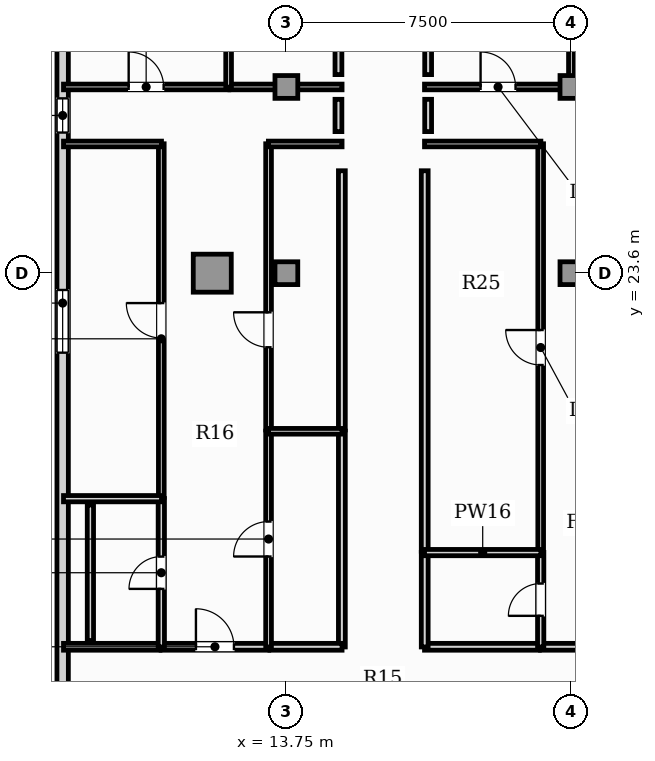
"""IFC4 building model, lengths in metres.
Left out: names, types, materials, properties, quantities, classifications, styles, units other than length and angle.
Written with IfcOpenShell. Run it as: python <this file> out.ifc"""

import sys

from ifc_helpers import new_model, si_unit, direction, frame, frame_2d, origin, origin_2d, place, context, subcontext, project, spatial, rectangle, hollow_rectangle, extrude, element, fill, save


model = new_model("IFC4")
c1 = context("Model", 3, precision=1e-05, world=origin(), true_north=direction((0.0, 1.0)))
c2 = subcontext(c1, "Body", "Model", "MODEL_VIEW")
j1 = project(units=[si_unit("LENGTHUNIT", "METRE"), si_unit("PLANEANGLEUNIT", "RADIAN")], contexts=[c1])
p1 = place(None, origin())
s1 = spatial("IfcSite", under=j1, at=p1, CompositionType="ELEMENT")
p2 = place(p1, origin())
s2 = spatial("IfcBuilding", under=s1, at=p2, CompositionType="ELEMENT")
p3 = place(p2, frame((0.0, 0.0, 242.65)))
s3 = spatial("IfcBuildingStorey", under=s2, at=p3, CompositionType="ELEMENT", Elevation=242.65)
p4 = place(p3, frame((11.8, 23.6, 0.0), z_axis=(0.0, 0.0, 1.0), x_axis=(1.0, 0.0, 0.0)))
e1 = element("IfcColumn", 1, at=p4, inside=s3, PredefinedType="USERDEFINED", context=c2, shape_type="SweptSolid", body=[
    extrude(hollow_rectangle(XDim=1.0, YDim=1.0, WallThickness=0.06, at=origin_2d()), origin(), (0.0, 0.0, 1.0), 3.85),
])
for number, where, z_axis, x_axis in (
    (2, (13.75, 23.6, 0.0), (0.0, 0.0, 1.0), (1.0, 0.0, 0.0)),
    (3, (21.25, 23.6, 0.0), (0.0, 0.0, 1.0), (1.0, 0.0, 0.0)),
    (4, (13.75, 28.5, 0.0), (0.0, 0.0, 1.0), (1.0, 0.0, 0.0)),
    (5, (21.25, 28.5, 0.0), (0.0, 0.0, 1.0), (1.0, 0.0, 0.0)),
):
    element("IfcColumn", number, at=place(p3, frame(where, z_axis=z_axis, x_axis=x_axis)), inside=s3, PredefinedType="COLUMN", context=c2, shape_type="SweptSolid", body=[
        extrude(rectangle(XDim=0.6, YDim=0.6, at=origin_2d()), origin(), (0.0, 0.0, 1.0), 3.85),
    ])
p5 = place(p3, frame((7.863, 33.343, 0.0), z_axis=(0.0, 0.0, 1.0), x_axis=(0.0, -1.0, 0.0)))
e6 = element("IfcWall", 6, at=p5, inside=s3, PredefinedType="SOLIDWALL", context=c2, shape_type="SweptSolid", body=[
    extrude(rectangle(XDim=30.103, YDim=0.3, at=frame_2d((15.052, 0.0))), origin(), (0.0, 0.0, 1.0), 3.5),
])
p6 = place(p5, frame((24.044, 0.0, 0.85)))
e7 = element("IfcOpeningElement", 7, at=p6, cuts=e6, PredefinedType="OPENING", context=c2, shape_type="SweptSolid", body=[
    extrude(rectangle(XDim=2.4, YDim=2.0, at=frame_2d((1.2, 1.0))), frame((0.0, 0.16, 0.0), z_axis=(0.0, -1.0, 0.0), x_axis=(1.0, 0.0, 0.0)), (0.0, 0.0, 1.0), 0.32),
])
p7 = place(p5, frame((5.143, 0.0, 0.95)))
e8 = element("IfcOpeningElement", 8, at=p7, cuts=e6, PredefinedType="OPENING", context=c2, shape_type="SweptSolid", body=[
    extrude(rectangle(XDim=0.9, YDim=1.5, at=frame_2d((0.45, 0.75))), frame((0.0, 0.16, 0.0), z_axis=(0.0, -1.0, 0.0), x_axis=(1.0, 0.0, 0.0)), (0.0, 0.0, 1.0), 0.32),
])
p8 = place(p5, frame((10.185, 0.0, 0.88)))
e9 = element("IfcOpeningElement", 9, at=p8, cuts=e6, PredefinedType="OPENING", context=c2, shape_type="SweptSolid", body=[
    extrude(rectangle(XDim=1.65, YDim=2.0, at=frame_2d((0.825, 1.0))), frame((0.0, 0.16, 0.0), z_axis=(0.0, -1.0, 0.0), x_axis=(1.0, 0.0, 0.0)), (0.0, 0.0, 1.0), 0.32),
])
p9 = place(p3, frame((10.454, 13.77, 0.0), z_axis=(0.0, 0.0, 1.0), x_axis=(1.0, 0.0, 0.0)))
e10 = element("IfcWall", 10, at=p9, inside=s3, PredefinedType="PARTITIONING", context=c2, shape_type="SweptSolid", body=[
    extrude(rectangle(XDim=2.832, YDim=0.18, at=frame_2d((1.416, 0.0))), origin(), (0.0, 0.0, 1.0), 3.5),
])
p10 = place(p9, frame((0.916, 0.0, 0.0)))
e11 = element("IfcOpeningElement", 11, at=p10, cuts=e10, PredefinedType="OPENING", context=c2, shape_type="SweptSolid", body=[
    extrude(rectangle(XDim=1.0, YDim=2.15, at=frame_2d((0.5, 1.075))), frame((0.0, 0.1, 0.0), z_axis=(0.0, -1.0, 0.0), x_axis=(1.0, 0.0, 0.0)), (0.0, 0.0, 1.0), 0.2),
])
p11 = place(p3, frame((7.886, 13.77, 0.0), z_axis=(0.0, 0.0, 1.0), x_axis=(1.0, 0.0, 0.0)))
e12 = element("IfcWall", 12, at=p11, inside=s3, PredefinedType="PARTITIONING", context=c2, shape_type="SweptSolid", body=[
    extrude(rectangle(XDim=2.538, YDim=0.18, at=frame_2d((1.269, 0.0))), origin(), (0.0, 0.0, 1.0), 3.5),
])
p12 = place(p3, frame((15.21, 13.765, 0.0), z_axis=(0.0, 0.0, 1.0), x_axis=(0.0, 1.0, 0.0)))
e13 = element("IfcWall", 13, at=p12, inside=s3, PredefinedType="PARTITIONING", context=c2, shape_type="SweptSolid", body=[
    extrude(rectangle(XDim=5.68, YDim=0.18, at=frame_2d((2.84, 0.0))), origin(), (0.0, 0.0, 1.0), 3.5),
])
p13 = place(p3, frame((13.316, 13.77, 0.0), z_axis=(0.0, 0.0, 1.0), x_axis=(1.0, 0.0, 0.0)))
e14 = element("IfcWall", 14, at=p13, inside=s3, PredefinedType="PARTITIONING", context=c2, shape_type="SweptSolid", body=[
    extrude(rectangle(XDim=1.899, YDim=0.18, at=frame_2d((0.949, 0.0))), origin(), (0.0, 0.0, 1.0), 3.5),
])
p14 = place(p3, frame((15.21, 19.475, 0.0), z_axis=(0.0, 0.0, 1.0), x_axis=(0.0, 1.0, 0.0)))
e15 = element("IfcWall", 15, at=p14, inside=s3, PredefinedType="PARTITIONING", context=c2, shape_type="SweptSolid", body=[
    extrude(rectangle(XDim=6.82, YDim=0.18, at=frame_2d((3.41, 0.0))), origin(), (0.0, 0.0, 1.0), 3.5),
])
p15 = place(p3, frame((20.437, 13.77, 0.0), z_axis=(0.0, 0.0, 1.0), x_axis=(1.0, 0.0, 0.0)))
e16 = element("IfcWall", 16, at=p15, inside=s3, PredefinedType="PARTITIONING", context=c2, shape_type="SweptSolid", body=[
    extrude(rectangle(XDim=4.76, YDim=0.18, at=frame_2d((2.38, 0.0))), origin(), (0.0, 0.0, 1.0), 3.5),
])
p16 = place(p15, frame((1.88, 0.0, 0.0)))
e17 = element("IfcOpeningElement", 17, at=p16, cuts=e16, PredefinedType="OPENING", context=c2, shape_type="SweptSolid", body=[
    extrude(rectangle(XDim=1.0, YDim=2.15, at=frame_2d((0.5, 1.075))), frame((0.0, 0.1, 0.0), z_axis=(0.0, -1.0, 0.0), x_axis=(1.0, 0.0, 0.0)), (0.0, 0.0, 1.0), 0.2),
])
p17 = place(p3, frame((17.385, 13.77, 0.0), z_axis=(0.0, 0.0, 1.0), x_axis=(1.0, 0.0, 0.0)))
e18 = element("IfcWall", 18, at=p17, inside=s3, PredefinedType="PARTITIONING", context=c2, shape_type="SweptSolid", body=[
    extrude(rectangle(XDim=3.021, YDim=0.18, at=frame_2d((1.511, 0.0))), origin(), (0.0, 0.0, 1.0), 3.5),
])
p18 = place(p3, frame((17.39, 13.765, 0.0), z_axis=(0.0, 0.0, 1.0), x_axis=(0.0, 1.0, 0.0)))
e19 = element("IfcWall", 19, at=p18, inside=s3, PredefinedType="PARTITIONING", context=c2, shape_type="SweptSolid", body=[
    extrude(rectangle(XDim=2.489, YDim=0.18, at=frame_2d((1.244, 0.0))), origin(), (0.0, 0.0, 1.0), 3.5),
])
p19 = place(p3, frame((17.39, 16.283, 0.0), z_axis=(0.0, 0.0, 1.0), x_axis=(0.0, 1.0, 0.0)))
e20 = element("IfcWall", 20, at=p19, inside=s3, PredefinedType="PARTITIONING", context=c2, shape_type="SweptSolid", body=[
    extrude(rectangle(XDim=10.011, YDim=0.18, at=frame_2d((5.006, 0.0))), origin(), (0.0, 0.0, 1.0), 3.5),
])
p20 = place(p3, frame((10.459, 13.765, 0.0), z_axis=(0.0, 0.0, 1.0), x_axis=(0.0, 1.0, 0.0)))
e21 = element("IfcWall", 21, at=p20, inside=s3, PredefinedType="PLUMBINGWALL", context=c2, shape_type="SweptSolid", body=[
    extrude(rectangle(XDim=3.907, YDim=0.165, at=frame_2d((1.953, 0.0))), origin(), (0.0, 0.0, 1.0), 3.5),
])
p21 = place(p20, frame((1.528, 0.0, 0.0)))
e22 = element("IfcOpeningElement", 22, at=p21, cuts=e21, PredefinedType="OPENING", context=c2, shape_type="SweptSolid", body=[
    extrude(rectangle(XDim=0.85, YDim=2.1, at=frame_2d((0.425, 1.05))), frame((0.0, 0.093, 0.0), z_axis=(0.0, -1.0, 0.0), x_axis=(1.0, 0.0, 0.0)), (0.0, 0.0, 1.0), 0.185),
])
p22 = place(p3, frame((10.459, 17.702, 0.0), z_axis=(0.0, 0.0, 1.0), x_axis=(0.0, 1.0, 0.0)))
e23 = element("IfcWall", 23, at=p22, inside=s3, PredefinedType="PARTITIONING", context=c2, shape_type="SweptSolid", body=[
    extrude(rectangle(XDim=9.303, YDim=0.15, at=frame_2d((4.652, 0.0))), origin(), (0.0, 0.0, 1.0), 3.5),
])
p23 = place(p22, frame((4.192, 0.0, 0.0)))
e24 = element("IfcOpeningElement", 24, at=p23, cuts=e23, PredefinedType="OPENING", context=c2, shape_type="SweptSolid", body=[
    extrude(rectangle(XDim=0.92, YDim=2.1, at=frame_2d((0.46, 1.05))), frame((0.0, 0.085, 0.0), z_axis=(0.0, -1.0, 0.0), x_axis=(1.0, 0.0, 0.0)), (0.0, 0.0, 1.0), 0.17),
])
p24 = place(p3, frame((7.886, 27.0, 0.0), z_axis=(0.0, 0.0, 1.0), x_axis=(1.0, 0.0, 0.0)))
e25 = element("IfcWall", 25, at=p24, inside=s3, PredefinedType="PARTITIONING", context=c2, shape_type="SweptSolid", body=[
    extrude(rectangle(XDim=2.578, YDim=0.15, at=frame_2d((1.289, 0.0))), origin(), (0.0, 0.0, 1.0), 3.5),
])
p25 = place(p3, frame((13.281, 13.765, 0.0), z_axis=(0.0, 0.0, 1.0), x_axis=(0.0, 1.0, 0.0)))
e26 = element("IfcWall", 26, at=p25, inside=s3, PredefinedType="PARTITIONING", context=c2, shape_type="SweptSolid", body=[
    extrude(rectangle(XDim=5.68, YDim=0.15, at=frame_2d((2.84, 0.0))), origin(), (0.0, 0.0, 1.0), 3.5),
])
p26 = place(p25, frame((2.38, 0.0, 0.0)))
e27 = element("IfcOpeningElement", 27, at=p26, cuts=e26, PredefinedType="OPENING", context=c2, shape_type="SweptSolid", body=[
    extrude(rectangle(XDim=0.92, YDim=2.1, at=frame_2d((0.46, 1.05))), frame((0.0, 0.085, 0.0), z_axis=(0.0, -1.0, 0.0), x_axis=(1.0, 0.0, 0.0)), (0.0, 0.0, 1.0), 0.17),
])
p27 = place(p3, frame((13.281, 19.475, 0.0), z_axis=(0.0, 0.0, 1.0), x_axis=(0.0, 1.0, 0.0)))
e28 = element("IfcWall", 28, at=p27, inside=s3, PredefinedType="PARTITIONING", context=c2, shape_type="SweptSolid", body=[
    extrude(rectangle(XDim=7.53, YDim=0.15, at=frame_2d((3.765, 0.0))), origin(), (0.0, 0.0, 1.0), 3.5),
])
p28 = place(p27, frame((2.176, 0.0, 0.0)))
e29 = element("IfcOpeningElement", 29, at=p28, cuts=e28, PredefinedType="OPENING", context=c2, shape_type="SweptSolid", body=[
    extrude(rectangle(XDim=0.92, YDim=2.1, at=frame_2d((0.46, 1.05))), frame((0.0, 0.085, 0.0), z_axis=(0.0, -1.0, 0.0), x_axis=(1.0, 0.0, 0.0)), (0.0, 0.0, 1.0), 0.17),
])
p29 = place(p3, frame((13.276, 27.0, 0.0), z_axis=(0.0, 0.0, 1.0), x_axis=(1.0, 0.0, 0.0)))
e30 = element("IfcWall", 30, at=p29, inside=s3, PredefinedType="PARTITIONING", context=c2, shape_type="SweptSolid", body=[
    extrude(rectangle(XDim=1.939, YDim=0.15, at=frame_2d((0.969, 0.0))), origin(), (0.0, 0.0, 1.0), 3.5),
])
p30 = place(p3, frame((7.886, 28.5, 0.0), z_axis=(0.0, 0.0, 1.0), x_axis=(1.0, 0.0, 0.0)))
e31 = element("IfcWall", 31, at=p30, inside=s3, PredefinedType="PARTITIONING", context=c2, shape_type="SweptSolid", body=[
    extrude(rectangle(XDim=4.349, YDim=0.15, at=frame_2d((2.175, 0.0))), origin(), (0.0, 0.0, 1.0), 3.5),
])
p31 = place(p30, frame((1.715, 0.0, 0.0)))
e32 = element("IfcOpeningElement", 32, at=p31, cuts=e31, PredefinedType="OPENING", context=c2, shape_type="SweptSolid", body=[
    extrude(rectangle(XDim=0.92, YDim=2.1, at=frame_2d((0.46, 1.05))), frame((0.0, 0.085, 0.0), z_axis=(0.0, -1.0, 0.0), x_axis=(1.0, 0.0, 0.0)), (0.0, 0.0, 1.0), 0.17),
])
p32 = place(p3, frame((12.265, 28.5, 0.0), z_axis=(0.0, 0.0, 1.0), x_axis=(1.0, 0.0, 0.0)))
e33 = element("IfcWall", 33, at=p32, inside=s3, PredefinedType="PARTITIONING", context=c2, shape_type="SweptSolid", body=[
    extrude(rectangle(XDim=2.95, YDim=0.15, at=frame_2d((1.475, 0.0))), origin(), (0.0, 0.0, 1.0), 2.956),
])
p33 = place(p3, frame((7.886, 17.667, 0.0), z_axis=(0.0, 0.0, 1.0), x_axis=(1.0, 0.0, 0.0)))
e34 = element("IfcWall", 34, at=p33, inside=s3, PredefinedType="PLUMBINGWALL", context=c2, shape_type="SweptSolid", body=[
    extrude(rectangle(XDim=2.578, YDim=0.165, at=frame_2d((1.289, 0.0))), origin(), (0.0, 0.0, 1.0), 3.5),
])
p34 = place(p3, frame((13.276, 19.44, 0.0), z_axis=(0.0, 0.0, 1.0), x_axis=(1.0, 0.0, 0.0)))
e35 = element("IfcWall", 35, at=p34, inside=s3, PredefinedType="PARTITIONING", context=c2, shape_type="SweptSolid", body=[
    extrude(rectangle(XDim=1.939, YDim=0.15, at=frame_2d((0.969, 0.0))), origin(), (0.0, 0.0, 1.0), 3.5),
])
p35 = place(p3, frame((12.23, 28.495, 0.0), z_axis=(0.0, 0.0, 1.0), x_axis=(0.0, 1.0, 0.0)))
e36 = element("IfcWall", 36, at=p35, inside=s3, PredefinedType="PARTITIONING", context=c2, shape_type="SweptSolid", body=[
    extrude(rectangle(XDim=7.916, YDim=0.15, at=frame_2d((3.958, 0.0))), origin(), (0.0, 0.0, 1.0), 3.5),
])
p36 = place(p35, frame((3.191, 0.0, 0.0)))
e37 = element("IfcOpeningElement", 37, at=p36, cuts=e36, PredefinedType="OPENING", context=c2, shape_type="SweptSolid", body=[
    extrude(rectangle(XDim=0.92, YDim=2.1, at=frame_2d((0.46, 1.05))), frame((0.0, 0.085, 0.0), z_axis=(0.0, -1.0, 0.0), x_axis=(1.0, 0.0, 0.0)), (0.0, 0.0, 1.0), 0.17),
])
p37 = place(p3, frame((20.442, 13.765, 0.0), z_axis=(0.0, 0.0, 1.0), x_axis=(0.0, 1.0, 0.0)))
e38 = element("IfcWall", 38, at=p37, inside=s3, PredefinedType="PLUMBINGWALL", context=c2, shape_type="SweptSolid", body=[
    extrude(rectangle(XDim=2.489, YDim=0.165, at=frame_2d((1.244, 0.0))), origin(), (0.0, 0.0, 1.0), 3.5),
])
p38 = place(p37, frame((0.819, 0.0, 0.0)))
e39 = element("IfcOpeningElement", 39, at=p38, cuts=e38, PredefinedType="OPENING", context=c2, shape_type="SweptSolid", body=[
    extrude(rectangle(XDim=0.85, YDim=2.1, at=frame_2d((0.425, 1.05))), frame((0.0, 0.093, 0.0), z_axis=(0.0, -1.0, 0.0), x_axis=(1.0, 0.0, 0.0)), (0.0, 0.0, 1.0), 0.185),
])
p39 = place(p3, frame((20.442, 16.283, 0.0), z_axis=(0.0, 0.0, 1.0), x_axis=(0.0, 1.0, 0.0)))
e40 = element("IfcWall", 40, at=p39, inside=s3, PredefinedType="PARTITIONING", context=c2, shape_type="SweptSolid", body=[
    extrude(rectangle(XDim=10.721, YDim=0.15, at=frame_2d((5.361, 0.0))), origin(), (0.0, 0.0, 1.0), 3.5),
])
p40 = place(p39, frame((4.901, 0.0, 0.0)))
e41 = element("IfcOpeningElement", 41, at=p40, cuts=e40, PredefinedType="OPENING", context=c2, shape_type="SweptSolid", body=[
    extrude(rectangle(XDim=0.92, YDim=2.1, at=frame_2d((0.46, 1.05))), frame((0.0, 0.085, 0.0), z_axis=(0.0, -1.0, 0.0), x_axis=(1.0, 0.0, 0.0)), (0.0, 0.0, 1.0), 0.17),
])
p41 = place(p3, frame((17.385, 27.0, 0.0), z_axis=(0.0, 0.0, 1.0), x_axis=(1.0, 0.0, 0.0)))
e42 = element("IfcWall", 42, at=p41, inside=s3, PredefinedType="PARTITIONING", context=c2, shape_type="SweptSolid", body=[
    extrude(rectangle(XDim=3.062, YDim=0.15, at=frame_2d((1.531, 0.0))), origin(), (0.0, 0.0, 1.0), 3.5),
])
p42 = place(p3, frame((17.385, 28.5, 0.0), z_axis=(0.0, 0.0, 1.0), x_axis=(1.0, 0.0, 0.0)))
e43 = element("IfcWall", 43, at=p42, inside=s3, PredefinedType="PARTITIONING", context=c2, shape_type="SweptSolid", body=[
    extrude(rectangle(XDim=3.87, YDim=0.15, at=frame_2d((1.935, 0.0))), origin(), (0.0, 0.0, 1.0), 2.956),
])
p43 = place(p42, frame((1.475, 0.0, 0.0)))
e44 = element("IfcOpeningElement", 44, at=p43, cuts=e43, PredefinedType="OPENING", context=c2, shape_type="SweptSolid", body=[
    extrude(rectangle(XDim=0.92, YDim=2.1, at=frame_2d((0.46, 1.05))), frame((0.0, 0.085, 0.0), z_axis=(0.0, -1.0, 0.0), x_axis=(1.0, 0.0, 0.0)), (0.0, 0.0, 1.0), 0.17),
])
p44 = place(p3, frame((21.285, 28.5, 0.0), z_axis=(0.0, 0.0, 1.0), x_axis=(1.0, 0.0, 0.0)))
e45 = element("IfcWall", 45, at=p44, inside=s3, PredefinedType="PARTITIONING", context=c2, shape_type="SweptSolid", body=[
    extrude(rectangle(XDim=2.536, YDim=0.15, at=frame_2d((1.268, 0.0))), origin(), (0.0, 0.0, 1.0), 2.956),
])
p45 = place(p44, frame((0.808, 0.0, 0.0)))
e46 = element("IfcOpeningElement", 46, at=p45, cuts=e45, PredefinedType="OPENING", context=c2, shape_type="SweptSolid", body=[
    extrude(rectangle(XDim=0.92, YDim=2.1, at=frame_2d((0.46, 1.05))), frame((0.0, 0.085, 0.0), z_axis=(0.0, -1.0, 0.0), x_axis=(1.0, 0.0, 0.0)), (0.0, 0.0, 1.0), 0.17),
])
p46 = place(p3, frame((17.385, 16.248, 0.0), z_axis=(0.0, 0.0, 1.0), x_axis=(1.0, 0.0, 0.0)))
e47 = element("IfcWall", 47, at=p46, inside=s3, PredefinedType="PLUMBINGWALL", context=c2, shape_type="SweptSolid", body=[
    extrude(rectangle(XDim=3.062, YDim=0.165, at=frame_2d((1.531, 0.0))), origin(), (0.0, 0.0, 1.0), 3.5),
])
p47 = place(p3, frame((21.25, 28.495, 0.0), z_axis=(0.0, 0.0, 1.0), x_axis=(0.0, 1.0, 0.0)))
e48 = element("IfcWall", 48, at=p47, inside=s3, PredefinedType="PARTITIONING", context=c2, shape_type="SweptSolid", body=[
    extrude(rectangle(XDim=7.916, YDim=0.15, at=frame_2d((3.958, 0.0))), origin(), (0.0, 0.0, 1.0), 3.5),
])
p48 = place(p3, frame((15.12, 28.175, 0.0), z_axis=(0.0, 0.0, 1.0), x_axis=(0.0, -1.0, 0.0)))
e49 = element("IfcWall", 49, at=p48, inside=s3, PredefinedType="PARTITIONING", context=c2, shape_type="SweptSolid", body=[
    extrude(rectangle(XDim=0.85, YDim=0.18, at=frame_2d((0.425, 0.0))), origin(), (0.0, 0.0, 1.0), 3.5),
])
p49 = place(p3, frame((8.593, 13.935, 0.0), z_axis=(0.0, 0.0, 1.0), x_axis=(0.0, 1.0, 0.0)))
e50 = element("IfcWall", 50, at=p49, inside=s3, PredefinedType="PLUMBINGWALL", context=c2, shape_type="SweptSolid", body=[
    extrude(rectangle(XDim=3.567, YDim=0.165, at=frame_2d((1.783, 0.0))), origin(), (0.0, 0.0, 1.0), 3.5),
])
p50 = place(p3, frame((15.12, 36.411, 0.0), z_axis=(0.0, 0.0, 1.0), x_axis=(0.0, -1.0, 0.0)))
e51 = element("IfcWall", 51, at=p50, inside=s3, PredefinedType="PARTITIONING", context=c2, shape_type="SweptSolid", body=[
    extrude(rectangle(XDim=7.586, YDim=0.18, at=frame_2d((3.793, 0.0))), origin(), (0.0, 0.0, 1.0), 3.5),
])
p51 = place(p3, frame((17.48, 27.325, 0.0), z_axis=(0.0, 0.0, 1.0), x_axis=(0.0, 1.0, 0.0)))
e52 = element("IfcWall", 52, at=p51, inside=s3, PredefinedType="PARTITIONING", context=c2, shape_type="SweptSolid", body=[
    extrude(rectangle(XDim=0.85, YDim=0.18, at=frame_2d((0.425, 0.0))), origin(), (0.0, 0.0, 1.0), 3.5),
])
p52 = place(p3, frame((17.48, 28.825, 0.0), z_axis=(0.0, 0.0, 1.0), x_axis=(0.0, 1.0, 0.0)))
e53 = element("IfcWall", 53, at=p52, inside=s3, PredefinedType="PARTITIONING", context=c2, shape_type="SweptSolid", body=[
    extrude(rectangle(XDim=7.586, YDim=0.18, at=frame_2d((3.793, 0.0))), origin(), (0.0, 0.0, 1.0), 3.5),
])
p53 = place(p7, origin())
e54 = element("IfcWindow", 54, at=p53, inside=s3, PartitioningType="SINGLE_PANEL", PredefinedType="WINDOW", context=c2, shape_type="SweptSolid", body=[
    extrude(rectangle(XDim=0.9, YDim=1.5, at=frame_2d((0.45, 0.75))), frame((0.0, 0.03, 0.0), z_axis=(0.0, -1.0, 0.0), x_axis=(1.0, 0.0, 0.0)), (0.0, 0.0, 1.0), 0.06),
])
fill(e8, e54)
p54 = place(p8, origin())
e55 = element("IfcWindow", 55, at=p54, inside=s3, PartitioningType="SINGLE_PANEL", PredefinedType="WINDOW", context=c2, shape_type="SweptSolid", body=[
    extrude(rectangle(XDim=1.65, YDim=2.0, at=frame_2d((0.825, 1.0))), frame((0.0, 0.03, 0.0), z_axis=(0.0, -1.0, 0.0), x_axis=(1.0, 0.0, 0.0)), (0.0, 0.0, 1.0), 0.06),
])
fill(e9, e55)
p55 = place(p10, origin())
e56 = element("IfcDoor", 56, at=p55, inside=s3, OperationType="SINGLE_SWING_LEFT", PredefinedType="DOOR", context=c2, shape_type="SweptSolid", body=[
    extrude(rectangle(XDim=1.0, YDim=2.15, at=frame_2d((0.5, 1.075))), frame((0.0, 0.025, 0.0), z_axis=(0.0, -1.0, 0.0), x_axis=(1.0, 0.0, 0.0)), (0.0, 0.0, 1.0), 0.05),
])
fill(e11, e56)
p56 = place(p21, origin())
e57 = element("IfcDoor", 57, at=p56, inside=s3, OperationType="SINGLE_SWING_LEFT", PredefinedType="DOOR", context=c2, shape_type="SweptSolid", body=[
    extrude(rectangle(XDim=0.85, YDim=2.1, at=frame_2d((0.425, 1.05))), frame((0.0, 0.025, 0.0), z_axis=(0.0, -1.0, 0.0), x_axis=(1.0, 0.0, 0.0)), (0.0, 0.0, 1.0), 0.05),
])
fill(e22, e57)
p57 = place(p23, origin())
e58 = element("IfcDoor", 58, at=p57, inside=s3, OperationType="SINGLE_SWING_RIGHT", PredefinedType="DOOR", context=c2, shape_type="SweptSolid", body=[
    extrude(rectangle(XDim=0.92, YDim=2.1, at=frame_2d((0.46, 1.05))), frame((0.0, 0.025, 0.0), z_axis=(0.0, -1.0, 0.0), x_axis=(1.0, 0.0, 0.0)), (0.0, 0.0, 1.0), 0.05),
])
fill(e24, e58)
p58 = place(p26, origin())
e59 = element("IfcDoor", 59, at=p58, inside=s3, OperationType="SINGLE_SWING_LEFT", PredefinedType="DOOR", context=c2, shape_type="SweptSolid", body=[
    extrude(rectangle(XDim=0.92, YDim=2.1, at=frame_2d((0.46, 1.05))), frame((0.0, 0.025, 0.0), z_axis=(0.0, -1.0, 0.0), x_axis=(1.0, 0.0, 0.0)), (0.0, 0.0, 1.0), 0.05),
])
fill(e27, e59)
p59 = place(p28, origin())
e60 = element("IfcDoor", 60, at=p59, inside=s3, OperationType="SINGLE_SWING_RIGHT", PredefinedType="DOOR", context=c2, shape_type="SweptSolid", body=[
    extrude(rectangle(XDim=0.92, YDim=2.1, at=frame_2d((0.46, 1.05))), frame((0.0, 0.025, 0.0), z_axis=(0.0, -1.0, 0.0), x_axis=(1.0, 0.0, 0.0)), (0.0, 0.0, 1.0), 0.05),
])
fill(e29, e60)
p60 = place(p31, origin())
e61 = element("IfcDoor", 61, at=p60, inside=s3, OperationType="SINGLE_SWING_LEFT", PredefinedType="DOOR", context=c2, shape_type="SweptSolid", body=[
    extrude(rectangle(XDim=0.92, YDim=2.1, at=frame_2d((0.46, 1.05))), frame((0.0, 0.025, 0.0), z_axis=(0.0, -1.0, 0.0), x_axis=(1.0, 0.0, 0.0)), (0.0, 0.0, 1.0), 0.05),
])
fill(e32, e61)
p61 = place(p38, origin())
e62 = element("IfcDoor", 62, at=p61, inside=s3, OperationType="SINGLE_SWING_LEFT", PredefinedType="DOOR", context=c2, shape_type="SweptSolid", body=[
    extrude(rectangle(XDim=0.85, YDim=2.1, at=frame_2d((0.425, 1.05))), frame((0.0, 0.025, 0.0), z_axis=(0.0, -1.0, 0.0), x_axis=(1.0, 0.0, 0.0)), (0.0, 0.0, 1.0), 0.05),
])
fill(e39, e62)
p62 = place(p40, origin())
e63 = element("IfcDoor", 63, at=p62, inside=s3, OperationType="SINGLE_SWING_RIGHT", PredefinedType="DOOR", context=c2, shape_type="SweptSolid", body=[
    extrude(rectangle(XDim=0.92, YDim=2.1, at=frame_2d((0.46, 1.05))), frame((0.0, 0.025, 0.0), z_axis=(0.0, -1.0, 0.0), x_axis=(1.0, 0.0, 0.0)), (0.0, 0.0, 1.0), 0.05),
])
fill(e41, e63)
p63 = place(p43, origin())
e64 = element("IfcDoor", 64, at=p63, inside=s3, OperationType="SINGLE_SWING_LEFT", PredefinedType="DOOR", context=c2, shape_type="SweptSolid", body=[
    extrude(rectangle(XDim=0.92, YDim=2.1, at=frame_2d((0.46, 1.05))), frame((0.0, 0.025, 0.0), z_axis=(0.0, -1.0, 0.0), x_axis=(1.0, 0.0, 0.0)), (0.0, 0.0, 1.0), 0.05),
])
fill(e44, e64)
save(model, sys.argv[1])
